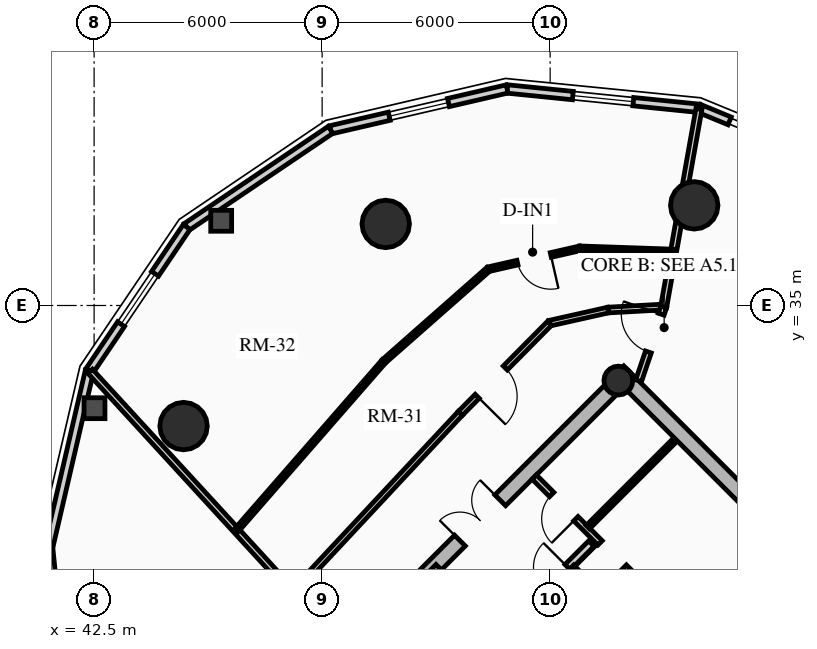
"""IFC4 building model, lengths in metres.
Left out: names, types, materials, properties, quantities, classifications, styles, units other than length and angle.
Written with IfcOpenShell. Run it as: python <this file> out.ifc"""

import sys

from ifc_helpers import new_model, si_unit, direction, frame, frame_2d, origin, origin_2d, place, context, subcontext, project, spatial, rectangle, circle, hollow_circle, extrude, source, transform, mapped, element, fill, save


model = new_model("IFC4")
c1 = context("Model", 3, precision=1e-05, world=origin(), true_north=direction((0.0, 1.0)))
c2 = subcontext(c1, "Body", "Model", "MODEL_VIEW")
j1 = project(units=[si_unit("LENGTHUNIT", "METRE"), si_unit("PLANEANGLEUNIT", "RADIAN")], contexts=[c1])
p1 = place(None, origin())
s1 = spatial("IfcSite", under=j1, at=p1, CompositionType="ELEMENT")
p2 = place(p1, origin())
s2 = spatial("IfcBuilding", under=s1, at=p2, CompositionType="ELEMENT")
p3 = place(p2, frame((0.0, 0.0, 166.15)))
s3 = spatial("IfcBuildingStorey", under=s2, at=p3, CompositionType="ELEMENT", Elevation=166.15)
p4 = place(p3, frame((66.268, 23.298, 0.0), z_axis=(0.0, 0.0, 1.0), x_axis=(-0.707106781187, 0.707106781187, 0.0)))
e1 = element("IfcWall", 1, at=p4, inside=s3, PredefinedType="SHEAR", context=c2, shape_type="SweptSolid", body=[
    extrude(rectangle(XDim=14.1, YDim=0.4, at=frame_2d((7.05, 0.0))), origin(), (0.0, 0.0, 1.0), 2.91),
])
p5 = place(p3, frame((48.873, 25.561, 0.0), z_axis=(0.0, 0.0, 1.0), x_axis=(0.707106781187, 0.707106781187, 0.0)))
e2 = element("IfcWall", 2, at=p5, inside=s3, PredefinedType="SHEAR", context=c2, shape_type="SweptSolid", body=[
    extrude(rectangle(XDim=10.7, YDim=0.4, at=frame_2d((5.35, 0.0))), origin(), (0.0, 0.0, 1.0), 2.91),
])
m1 = source(origin(), c2, "Body", "SweptSolid", [
    extrude(rectangle(XDim=1.5, YDim=2.02, at=frame_2d((0.75, 1.01))), frame((0.0, 0.21, 0.0), z_axis=(0.0, -1.0, 0.0), x_axis=(1.0, 0.0, 0.0)), (0.0, 0.0, 1.0), 0.42),
])
p6 = place(p5, frame((4.6, 0.0, 0.0)))
e3 = element("IfcOpeningElement", 3, at=p6, cuts=e2, PredefinedType="OPENING", context=c2, shape_type="MappedRepresentation", body=[
    mapped(m1, transform((0.0, 0.0, 0.0), x_axis=(1.0, 0.0, 0.0), y_axis=(0.0, 1.0, 0.0), z_axis=(0.0, 0.0, 1.0), scale=1.0)),
])
p7 = place(p3, frame((61.06, 18.373, 0.0), z_axis=(0.0, 0.0, 1.0), x_axis=(-0.707106781187, 0.707106781187, 0.0)))
e4 = element("IfcWall", 4, at=p7, inside=s3, PredefinedType="SHEAR", context=c2, shape_type="SweptSolid", body=[
    extrude(rectangle(XDim=13.7, YDim=0.35, at=frame_2d((6.85, 0.0))), origin(), (0.0, 0.0, 1.0), 2.91),
])
m2 = source(origin(), c2, "Body", "SweptSolid", [
    extrude(rectangle(XDim=1.1, YDim=2.015, at=frame_2d((0.55, 1.007))), frame((0.0, 0.185, 0.0), z_axis=(0.0, -1.0, 0.0), x_axis=(1.0, 0.0, 0.0)), (0.0, 0.0, 1.0), 0.37),
])
p8 = place(p7, frame((4.85, 0.0, 0.0)))
e5 = element("IfcOpeningElement", 5, at=p8, cuts=e4, PredefinedType="OPENING", context=c2, shape_type="MappedRepresentation", body=[
    mapped(m2, transform((0.0, 0.0, 0.0), x_axis=(1.0, 0.0, 0.0), y_axis=(0.0, 1.0, 0.0), z_axis=(0.0, 0.0, 1.0), scale=1.0)),
])
p9 = place(p7, frame((0.625, 0.0, 0.0)))
e6 = element("IfcOpeningElement", 6, at=p9, cuts=e4, PredefinedType="OPENING", context=c2, shape_type="MappedRepresentation", body=[
    mapped(m2, transform((0.0, 0.0, 0.0), x_axis=(1.0, 0.0, 0.0), y_axis=(0.0, 1.0, 0.0), z_axis=(0.0, 0.0, 1.0), scale=1.0)),
])
p10 = place(p7, frame((2.625, 0.0, 0.0)))
e7 = element("IfcOpeningElement", 7, at=p10, cuts=e4, PredefinedType="OPENING", context=c2, shape_type="MappedRepresentation", body=[
    mapped(m2, transform((0.0, 0.0, 0.0), x_axis=(1.0, 0.0, 0.0), y_axis=(0.0, 1.0, 0.0), z_axis=(0.0, 0.0, 1.0), scale=1.0)),
])
m3 = source(origin(), c2, "Body", "SweptSolid", [
    extrude(rectangle(XDim=1.15, YDim=2.02, at=frame_2d((0.575, 1.01))), frame((0.0, 0.185, 0.0), z_axis=(0.0, -1.0, 0.0), x_axis=(1.0, 0.0, 0.0)), (0.0, 0.0, 1.0), 0.37),
])
p11 = place(p7, frame((7.27, 0.0, 0.0)))
e8 = element("IfcOpeningElement", 8, at=p11, cuts=e4, PredefinedType="OPENING", context=c2, shape_type="MappedRepresentation", body=[
    mapped(m3, transform((0.0, 0.0, 0.0), x_axis=(1.0, 0.0, 0.0), y_axis=(0.0, 1.0, 0.0), z_axis=(0.0, 0.0, 1.0), scale=1.0)),
])
p12 = place(p3, frame((58.893, 25.674, 0.0), z_axis=(0.0, 0.0, 1.0), x_axis=(0.707106781187, 0.707106781187, 0.0)))
e9 = element("IfcWall", 9, at=p12, inside=s3, PredefinedType="SHEAR", context=c2, shape_type="SweptSolid", body=[
    extrude(rectangle(XDim=3.285, YDim=0.35, at=frame_2d((1.643, 0.0))), origin(), (0.0, 0.0, 1.0), 2.91),
])
p13 = place(p3, frame((56.294, 33.024, 0.0), z_axis=(0.0, 0.0, 1.0), x_axis=(0.707106781187, 0.707106781187, 0.0)))
e10 = element("IfcColumn", 10, at=p13, inside=s3, PredefinedType="COLUMN", context=c2, shape_type="SweptSolid", body=[
    extrude(hollow_circle(Radius=0.38, WallThickness=0.032, at=origin_2d()), origin(), (0.0, 0.0, 1.0), 2.91),
])
for number, where, z_axis, x_axis in (
    (11, (58.291, 37.635, 0.0), (0.0, 0.0, 1.0), (1.0, 0.0, 0.0)),
    (12, (50.173, 37.146, 0.0), (0.0, 0.0, 1.0), (1.0, 0.0, 0.0)),
    (13, (44.854, 31.827, 0.0), (0.0, 0.0, 1.0), (1.0, 0.0, 0.0)),
):
    element("IfcColumn", number, at=place(p3, frame(where, z_axis=z_axis, x_axis=x_axis)), inside=s3, PredefinedType="USERDEFINED", context=c2, shape_type="SweptSolid", body=[
        extrude(circle(Radius=0.625, at=origin_2d()), origin(), (0.0, 0.0, 1.0), 2.91),
    ])
p14 = place(p3, frame((58.418, 40.189, 0.0), z_axis=(0.0, 0.0, 1.0), x_axis=(0.924556017656, -0.381046152345, 0.0)))
e14 = element("IfcWall", 14, at=p14, inside=s3, PredefinedType="SOLIDWALL", context=c2, shape_type="SweptSolid", body=[
    extrude(rectangle(XDim=0.87, YDim=0.22, at=frame_2d((0.435, 0.0))), origin(), (0.0, 0.0, 1.0), 2.675),
])
p15 = place(p3, frame((53.367, 40.698, 0.0), z_axis=(0.0, 0.0, 1.0), x_axis=(0.994959267396, -0.100279889424, 0.0)))
e15 = element("IfcWall", 15, at=p15, inside=s3, PredefinedType="SOLIDWALL", context=c2, shape_type="SweptSolid", body=[
    extrude(rectangle(XDim=5.076, YDim=0.22, at=frame_2d((2.538, 0.0))), origin(), (0.0, 0.0, 1.0), 2.675),
])
m4 = source(origin(), c2, "Body", "SweptSolid", [
    extrude(rectangle(XDim=1.6, YDim=1.3, at=frame_2d((0.8, 0.65))), frame((0.0, 0.12, 0.0), z_axis=(0.0, -1.0, 0.0), x_axis=(1.0, 0.0, 0.0)), (0.0, 0.0, 1.0), 0.24),
])
p16 = place(p15, frame((1.738, 0.0, 0.65)))
e16 = element("IfcOpeningElement", 16, at=p16, cuts=e15, PredefinedType="OPENING", context=c2, shape_type="MappedRepresentation", body=[
    mapped(m4, transform((0.0, 0.0, 0.0), x_axis=(1.0, 0.0, 0.0), y_axis=(0.0, 1.0, 0.0), z_axis=(0.0, 0.0, 1.0), scale=1.0)),
])
p17 = place(p3, frame((48.721, 39.622, 0.0), z_axis=(0.0, 0.0, 1.0), x_axis=(0.974206226622, 0.225659540039, 0.0)))
e17 = element("IfcWall", 17, at=p17, inside=s3, PredefinedType="SOLIDWALL", context=c2, shape_type="SweptSolid", body=[
    extrude(rectangle(XDim=4.769, YDim=0.22, at=frame_2d((2.385, 0.0))), origin(), (0.0, 0.0, 1.0), 2.675),
])
p18 = place(p17, frame((1.585, 0.0, 0.65)))
e18 = element("IfcOpeningElement", 18, at=p18, cuts=e17, PredefinedType="OPENING", context=c2, shape_type="MappedRepresentation", body=[
    mapped(m4, transform((0.0, 0.0, 0.0), x_axis=(1.0, 0.0, 0.0), y_axis=(0.0, 1.0, 0.0), z_axis=(0.0, 0.0, 1.0), scale=1.0)),
])
p19 = place(p3, frame((44.935, 37.065, 0.0), z_axis=(0.0, 0.0, 1.0), x_axis=(0.828739009952, 0.559635286042, 0.0)))
e19 = element("IfcWall", 19, at=p19, inside=s3, PredefinedType="SOLIDWALL", context=c2, shape_type="SweptSolid", body=[
    extrude(rectangle(XDim=4.569, YDim=0.22, at=frame_2d((2.284, 0.0))), origin(), (0.0, 0.0, 1.0), 2.675),
])
p20 = place(p3, frame((42.378, 33.279, 0.0), z_axis=(0.0, 0.0, 1.0), x_axis=(0.559635286042, 0.828739009952, 0.0)))
e20 = element("IfcWall", 20, at=p20, inside=s3, PredefinedType="SOLIDWALL", context=c2, shape_type="SweptSolid", body=[
    extrude(rectangle(XDim=4.569, YDim=0.22, at=frame_2d((2.284, 0.0))), origin(), (0.0, 0.0, 1.0), 2.675),
])
p21 = place(p20, frame((1.484, 0.0, 0.65)))
e21 = element("IfcOpeningElement", 21, at=p21, cuts=e20, PredefinedType="OPENING", context=c2, shape_type="MappedRepresentation", body=[
    mapped(m4, transform((0.0, 0.0, 0.0), x_axis=(1.0, 0.0, 0.0), y_axis=(0.0, 1.0, 0.0), z_axis=(0.0, 0.0, 1.0), scale=1.0)),
])
p22 = place(p3, frame((41.302, 28.633, 0.0), z_axis=(0.0, 0.0, 1.0), x_axis=(0.225659540039, 0.974206226622, 0.0)))
e22 = element("IfcWall", 22, at=p22, inside=s3, PredefinedType="SOLIDWALL", context=c2, shape_type="SweptSolid", body=[
    extrude(rectangle(XDim=4.769, YDim=0.22, at=frame_2d((2.385, 0.0))), origin(), (0.0, 0.0, 1.0), 2.675),
])
p23 = place(p3, frame((41.811, 23.582, 0.0), z_axis=(0.0, 0.0, 1.0), x_axis=(-0.100279889424, 0.994959267396, 0.0)))
e23 = element("IfcWall", 23, at=p23, inside=s3, PredefinedType="SOLIDWALL", context=c2, shape_type="SweptSolid", body=[
    extrude(rectangle(XDim=5.076, YDim=0.22, at=frame_2d((2.538, 0.0))), origin(), (0.0, 0.0, 1.0), 2.675),
])
p24 = place(p23, frame((1.738, 0.0, 0.65)))
e24 = element("IfcOpeningElement", 24, at=p24, cuts=e23, PredefinedType="OPENING", context=c2, shape_type="MappedRepresentation", body=[
    mapped(m4, transform((0.0, 0.0, 0.0), x_axis=(1.0, 0.0, 0.0), y_axis=(0.0, 1.0, 0.0), z_axis=(0.0, 0.0, 1.0), scale=1.0)),
])
p25 = place(p3, frame((53.264, 26.416, 0.0), z_axis=(0.0, 0.0, 1.0), x_axis=(0.707106781187, 0.707106781187, 0.0)))
e25 = element("IfcWall", 25, at=p25, inside=s3, PredefinedType="PARTITIONING", context=c2, shape_type="SweptSolid", body=[
    extrude(rectangle(XDim=3.28, YDim=0.2, at=frame_2d((1.64, 0.0))), origin(), (0.0, 0.0, 1.0), 2.675),
])
m5 = source(origin(), c2, "Body", "SweptSolid", [
    extrude(rectangle(XDim=1.0, YDim=2.015, at=frame_2d((0.5, 1.007))), frame((0.0, 0.11, 0.0), z_axis=(0.0, -1.0, 0.0), x_axis=(1.0, 0.0, 0.0)), (0.0, 0.0, 1.0), 0.22),
])
p26 = place(p25, frame((0.14, 0.0, 0.0)))
e26 = element("IfcOpeningElement", 26, at=p26, cuts=e25, PredefinedType="OPENING", context=c2, shape_type="MappedRepresentation", body=[
    mapped(m5, transform((0.0, 0.0, 0.0), x_axis=(1.0, 0.0, 0.0), y_axis=(0.0, 1.0, 0.0), z_axis=(0.0, 0.0, 1.0), scale=1.0)),
])
m6 = source(origin(), c2, "Body", "SweptSolid", [
    extrude(rectangle(XDim=0.9, YDim=2.005, at=frame_2d((0.45, 1.002))), frame((0.0, 0.11, 0.0), z_axis=(0.0, -1.0, 0.0), x_axis=(1.0, 0.0, 0.0)), (0.0, 0.0, 1.0), 0.22),
])
p27 = place(p25, frame((1.5, 0.0, 0.0)))
e27 = element("IfcOpeningElement", 27, at=p27, cuts=e25, PredefinedType="OPENING", context=c2, shape_type="MappedRepresentation", body=[
    mapped(m6, transform((0.0, 0.0, 0.0), x_axis=(1.0, 0.0, 0.0), y_axis=(0.0, 1.0, 0.0), z_axis=(0.0, 0.0, 1.0), scale=1.0)),
])
p28 = place(p3, frame((56.673, 26.529, 0.0), z_axis=(0.0, 0.0, 1.0), x_axis=(-0.707052764397, 0.70716079385, 0.0)))
e28 = element("IfcWall", 28, at=p28, inside=s3, PredefinedType="PARTITIONING", context=c2, shape_type="SweptSolid", body=[
    extrude(rectangle(XDim=2.26, YDim=0.125, at=frame_2d((1.13, 0.0))), origin(), (0.0, 0.0, 1.0), 2.675),
])
m7 = source(origin(), c2, "Body", "SweptSolid", [
    extrude(rectangle(XDim=0.9, YDim=2.005, at=frame_2d((0.45, 1.002))), frame((0.0, 0.073, 0.0), z_axis=(0.0, -1.0, 0.0), x_axis=(1.0, 0.0, 0.0)), (0.0, 0.0, 1.0), 0.145),
])
p29 = place(p28, frame((0.65, 0.0, 0.0)))
e29 = element("IfcOpeningElement", 29, at=p29, cuts=e28, PredefinedType="OPENING", context=c2, shape_type="MappedRepresentation", body=[
    mapped(m7, transform((0.0, 0.0, 0.0), x_axis=(1.0, 0.0, 0.0), y_axis=(0.0, 1.0, 0.0), z_axis=(0.0, 0.0, 1.0), scale=1.0)),
])
p30 = place(p3, frame((56.839, 27.728, 0.0), z_axis=(0.0, 0.0, 1.0), x_axis=(-0.707106781187, 0.707106781187, 0.0)))
e30 = element("IfcWall", 30, at=p30, inside=s3, PredefinedType="PARTITIONING", context=c2, shape_type="SweptSolid", body=[
    extrude(rectangle(XDim=3.9, YDim=0.16, at=frame_2d((1.95, 0.0))), origin(), (0.0, 0.0, 1.0), 2.675),
])
m8 = source(origin(), c2, "Body", "SweptSolid", [
    extrude(rectangle(XDim=0.9, YDim=2.005, at=frame_2d((0.45, 1.002))), frame((0.0, 0.09, 0.0), z_axis=(0.0, -1.0, 0.0), x_axis=(1.0, 0.0, 0.0)), (0.0, 0.0, 1.0), 0.18),
])
p31 = place(p30, frame((0.55, 0.0, 0.0)))
e31 = element("IfcOpeningElement", 31, at=p31, cuts=e30, PredefinedType="OPENING", context=c2, shape_type="MappedRepresentation", body=[
    mapped(m8, transform((0.0, 0.0, 0.0), x_axis=(1.0, 0.0, 0.0), y_axis=(0.0, 1.0, 0.0), z_axis=(0.0, 0.0, 1.0), scale=1.0)),
])
p32 = place(p30, frame((2.35, 0.0, 0.0)))
e32 = element("IfcOpeningElement", 32, at=p32, cuts=e30, PredefinedType="OPENING", context=c2, shape_type="MappedRepresentation", body=[
    mapped(m8, transform((0.0, 0.0, 0.0), x_axis=(1.0, 0.0, 0.0), y_axis=(0.0, 1.0, 0.0), z_axis=(0.0, 0.0, 1.0), scale=1.0)),
])
p33 = place(p3, frame((55.492, 29.167, 0.0), z_axis=(0.0, 0.0, 1.0), x_axis=(0.707144688645, 0.707068871696, 0.0)))
e33 = element("IfcWall", 33, at=p33, inside=s3, PredefinedType="PARTITIONING", context=c2, shape_type="SweptSolid", body=[
    extrude(rectangle(XDim=3.22, YDim=0.125, at=frame_2d((1.61, 0.0))), origin(), (0.0, 0.0, 1.0), 2.212),
])
p34 = place(p3, frame((57.486, 34.96, 0.0), z_axis=(0.0, 0.0, 1.0), x_axis=(-0.998483871836, -0.055045051404, 0.0)))
e34 = element("IfcWall", 34, at=p34, inside=s3, PredefinedType="PARTITIONING", context=c2, shape_type="SweptSolid", body=[
    extrude(rectangle(XDim=1.464, YDim=0.15, at=frame_2d((0.732, 0.0))), origin(), (0.0, 0.0, 1.0), 2.245),
])
p35 = place(p3, frame((56.025, 34.88, 0.0), z_axis=(0.0, 0.0, 1.0), x_axis=(-0.975729093394, -0.218981132301, 0.0)))
e35 = element("IfcWall", 35, at=p35, inside=s3, PredefinedType="PARTITIONING", context=c2, shape_type="SweptSolid", body=[
    extrude(rectangle(XDim=1.575, YDim=0.15, at=frame_2d((0.788, 0.0))), origin(), (0.0, 0.0, 1.0), 2.245),
])
p36 = place(p3, frame((54.488, 34.535, 0.0), z_axis=(0.0, 0.0, 1.0), x_axis=(-0.703666289339, -0.710530613871, 0.0)))
e36 = element("IfcWall", 36, at=p36, inside=s3, PredefinedType="PARTITIONING", context=c2, shape_type="SweptSolid", body=[
    extrude(rectangle(XDim=3.343, YDim=0.15, at=frame_2d((1.672, 0.0))), origin(), (0.0, 0.0, 1.0), 2.245),
])
m9 = source(origin(), c2, "Body", "SweptSolid", [
    extrude(rectangle(XDim=1.05, YDim=2.015, at=frame_2d((0.525, 1.007))), frame((0.0, 0.085, 0.0), z_axis=(0.0, -1.0, 0.0), x_axis=(1.0, 0.0, 0.0)), (0.0, 0.0, 1.0), 0.17),
])
p37 = place(p36, frame((1.66, 0.0, 0.0)))
e37 = element("IfcOpeningElement", 37, at=p37, cuts=e36, PredefinedType="OPENING", context=c2, shape_type="MappedRepresentation", body=[
    mapped(m9, transform((0.0, 0.0, 0.0), x_axis=(1.0, 0.0, 0.0), y_axis=(0.0, 1.0, 0.0), z_axis=(0.0, 0.0, 1.0), scale=1.0)),
])
p38 = place(p3, frame((52.135, 32.159, 0.0), z_axis=(0.0, 0.0, 1.0), x_axis=(-0.682546302454, -0.730842353047, 0.0)))
e38 = element("IfcWall", 38, at=p38, inside=s3, PredefinedType="PARTITIONING", context=c2, shape_type="SweptSolid", body=[
    extrude(rectangle(XDim=6.445, YDim=0.15, at=frame_2d((3.223, 0.0))), origin(), (0.0, 0.0, 1.0), 2.245),
])
p39 = place(p3, frame((57.486, 34.96, 0.0), z_axis=(0.0, 0.0, 1.0), x_axis=(0.175432895983, 0.984491391027, 0.0)))
e39 = element("IfcWall", 39, at=p39, inside=s3, PredefinedType="PARTITIONING", context=c2, shape_type="SweptSolid", body=[
    extrude(rectangle(XDim=5.291, YDim=0.16, at=frame_2d((2.646, 0.0))), origin(), (0.0, 0.0, 1.0), 2.245),
])
p40 = place(p3, frame((47.736, 27.449, 0.0), z_axis=(0.0, 0.0, 1.0), x_axis=(-0.676056254668, 0.736850012231, 0.0)))
e40 = element("IfcWall", 40, at=p40, inside=s3, PredefinedType="PARTITIONING", context=c2, shape_type="SweptSolid", body=[
    extrude(rectangle(XDim=7.899, YDim=0.16, at=frame_2d((3.95, 0.0))), origin(), (0.0, 0.0, 1.0), 2.245),
])
p41 = place(p3, frame((56.828, 33.021, 0.0), z_axis=(0.0, 0.0, 1.0), x_axis=(0.321300161671, 0.94697740528, 0.0)))
e41 = element("IfcWall", 41, at=p41, inside=s3, PredefinedType="PARTITIONING", context=c2, shape_type="SweptSolid", body=[
    extrude(rectangle(XDim=2.049, YDim=0.16, at=frame_2d((1.024, 0.0))), origin(), (0.0, 0.0, 1.0), 2.245),
])
m10 = source(origin(), c2, "Body", "SweptSolid", [
    extrude(rectangle(XDim=1.05, YDim=2.015, at=frame_2d((0.525, 1.007))), frame((0.0, 0.09, 0.0), z_axis=(0.0, -1.0, 0.0), x_axis=(1.0, 0.0, 0.0)), (0.0, 0.0, 1.0), 0.18),
])
p42 = place(p41, frame((0.798, 0.0, 0.0)))
e42 = element("IfcOpeningElement", 42, at=p42, cuts=e41, PredefinedType="OPENING", context=c2, shape_type="MappedRepresentation", body=[
    mapped(m10, transform((0.0, 0.0, 0.0), x_axis=(1.0, 0.0, 0.0), y_axis=(0.0, 1.0, 0.0), z_axis=(0.0, 0.0, 1.0), scale=1.0)),
])
p43 = place(p3, frame((57.746, 36.419, 0.0), z_axis=(0.0, 0.0, 1.0), x_axis=(-0.999409872703, 0.03434976484, 0.0)))
e43 = element("IfcWall", 43, at=p43, inside=s3, PredefinedType="PARTITIONING", context=c2, shape_type="SweptSolid", body=[
    extrude(rectangle(XDim=2.466, YDim=0.125, at=frame_2d((1.233, 0.0))), origin(), (0.0, 0.0, 1.0), 2.245),
])
p44 = place(p3, frame((55.281, 36.504, 0.0), z_axis=(0.0, 0.0, 1.0), x_axis=(-0.974908832019, -0.222604513096, 0.0)))
e44 = element("IfcWall", 44, at=p44, inside=s3, PredefinedType="PARTITIONING", context=c2, shape_type="SweptSolid", body=[
    extrude(rectangle(XDim=2.468, YDim=0.125, at=frame_2d((1.234, 0.0))), origin(), (0.0, 0.0, 1.0), 2.245),
])
p45 = place(p44, frame((0.784, 0.0, 0.0)))
e45 = element("IfcOpeningElement", 45, at=p45, cuts=e44, PredefinedType="OPENING", context=c2, shape_type="MappedRepresentation", body=[
    mapped(m7, transform((0.0, 0.0, 0.0), x_axis=(1.0, 0.0, 0.0), y_axis=(0.0, 1.0, 0.0), z_axis=(0.0, 0.0, 1.0), scale=1.0)),
])
p46 = place(p3, frame((52.876, 35.954, 0.0), z_axis=(0.0, 0.0, 1.0), x_axis=(-0.750317340408, -0.661077823469, 0.0)))
e46 = element("IfcWall", 46, at=p46, inside=s3, PredefinedType="PARTITIONING", context=c2, shape_type="SweptSolid", body=[
    extrude(rectangle(XDim=3.669, YDim=0.125, at=frame_2d((1.834, 0.0))), origin(), (0.0, 0.0, 1.0), 2.245),
])
p47 = place(p3, frame((50.123, 33.529, 0.0), z_axis=(0.0, 0.0, 1.0), x_axis=(-0.657371249324, -0.753566878626, 0.0)))
e47 = element("IfcWall", 47, at=p47, inside=s3, PredefinedType="PARTITIONING", context=c2, shape_type="SweptSolid", body=[
    extrude(rectangle(XDim=5.906, YDim=0.125, at=frame_2d((2.953, 0.0))), origin(), (0.0, 0.0, 1.0), 2.245),
])
m11 = source(origin(), c2, "Body", "SweptSolid", [
    extrude(rectangle(XDim=1.6, YDim=1.3, at=frame_2d((0.8, 0.65))), frame((0.0, 0.03, 0.0), z_axis=(0.0, -1.0, 0.0), x_axis=(1.0, 0.0, 0.0)), (0.0, 0.0, 1.0), 0.06),
])
p48 = place(p16, origin())
e48 = element("IfcWindow", 48, at=p48, inside=s3, PartitioningType="SINGLE_PANEL", PredefinedType="WINDOW", context=c2, shape_type="MappedRepresentation", body=[
    mapped(m11, transform((0.0, 0.0, 0.0), x_axis=(1.0, 0.0, 0.0), y_axis=(0.0, 1.0, 0.0), z_axis=(0.0, 0.0, 1.0), scale=1.0)),
])
fill(e16, e48)
p49 = place(p18, origin())
e49 = element("IfcWindow", 49, at=p49, inside=s3, PartitioningType="SINGLE_PANEL", PredefinedType="WINDOW", context=c2, shape_type="MappedRepresentation", body=[
    mapped(m11, transform((0.0, 0.0, 0.0), x_axis=(1.0, 0.0, 0.0), y_axis=(0.0, 1.0, 0.0), z_axis=(0.0, 0.0, 1.0), scale=1.0)),
])
fill(e18, e49)
p50 = place(p21, origin())
e50 = element("IfcWindow", 50, at=p50, inside=s3, PartitioningType="SINGLE_PANEL", PredefinedType="WINDOW", context=c2, shape_type="MappedRepresentation", body=[
    mapped(m11, transform((0.0, 0.0, 0.0), x_axis=(1.0, 0.0, 0.0), y_axis=(0.0, 1.0, 0.0), z_axis=(0.0, 0.0, 1.0), scale=1.0)),
])
fill(e21, e50)
m12 = source(origin(), c2, "Body", "SweptSolid", [
    extrude(rectangle(XDim=1.5, YDim=2.02, at=frame_2d((0.75, 1.01))), frame((0.0, 0.025, 0.0), z_axis=(0.0, -1.0, 0.0), x_axis=(1.0, 0.0, 0.0)), (0.0, 0.0, 1.0), 0.05),
])
p51 = place(p6, origin())
e51 = element("IfcDoor", 51, at=p51, inside=s3, OperationType="DOUBLE_DOOR_SINGLE_SWING", PredefinedType="DOOR", context=c2, shape_type="MappedRepresentation", body=[
    mapped(m12, transform((0.0, 0.0, 0.0), x_axis=(1.0, 0.0, 0.0), y_axis=(0.0, 1.0, 0.0), z_axis=(0.0, 0.0, 1.0), scale=1.0)),
])
fill(e3, e51)
m13 = source(origin(), c2, "Body", "SweptSolid", [
    extrude(rectangle(XDim=0.9, YDim=2.005, at=frame_2d((0.45, 1.002))), frame((0.0, 0.025, 0.0), z_axis=(0.0, -1.0, 0.0), x_axis=(1.0, 0.0, 0.0)), (0.0, 0.0, 1.0), 0.05),
])
p52 = place(p27, origin())
e52 = element("IfcDoor", 52, at=p52, inside=s3, OperationType="SINGLE_SWING_RIGHT", PredefinedType="DOOR", context=c2, shape_type="MappedRepresentation", body=[
    mapped(m13, transform((0.0, 0.0, 0.0), x_axis=(1.0, 0.0, 0.0), y_axis=(0.0, 1.0, 0.0), z_axis=(0.0, 0.0, 1.0), scale=1.0)),
])
fill(e27, e52)
p53 = place(p31, origin())
e53 = element("IfcDoor", 53, at=p53, inside=s3, OperationType="SINGLE_SWING_RIGHT", PredefinedType="DOOR", context=c2, shape_type="MappedRepresentation", body=[
    mapped(m13, transform((0.0, 0.0, 0.0), x_axis=(1.0, 0.0, 0.0), y_axis=(0.0, 1.0, 0.0), z_axis=(0.0, 0.0, 1.0), scale=1.0)),
])
fill(e31, e53)
p54 = place(p32, origin())
e54 = element("IfcDoor", 54, at=p54, inside=s3, OperationType="SINGLE_SWING_LEFT", PredefinedType="DOOR", context=c2, shape_type="MappedRepresentation", body=[
    mapped(m13, transform((0.0, 0.0, 0.0), x_axis=(1.0, 0.0, 0.0), y_axis=(0.0, 1.0, 0.0), z_axis=(0.0, 0.0, 1.0), scale=1.0)),
])
fill(e32, e54)
m14 = source(origin(), c2, "Body", "SweptSolid", [
    extrude(rectangle(XDim=1.05, YDim=2.015, at=frame_2d((0.525, 1.007))), frame((0.0, 0.025, 0.0), z_axis=(0.0, -1.0, 0.0), x_axis=(1.0, 0.0, 0.0)), (0.0, 0.0, 1.0), 0.05),
])
p55 = place(p42, origin())
e55 = element("IfcDoor", 55, at=p55, inside=s3, OperationType="SINGLE_SWING_RIGHT", PredefinedType="DOOR", context=c2, shape_type="MappedRepresentation", body=[
    mapped(m14, transform((0.0, 0.0, 0.0), x_axis=(1.0, 0.0, 0.0), y_axis=(0.0, 1.0, 0.0), z_axis=(0.0, 0.0, 1.0), scale=1.0)),
])
fill(e42, e55)
p56 = place(p37, origin())
e56 = element("IfcDoor", 56, at=p56, inside=s3, OperationType="SINGLE_SWING_RIGHT", PredefinedType="DOOR", context=c2, shape_type="MappedRepresentation", body=[
    mapped(m14, transform((0.0, 0.0, 0.0), x_axis=(1.0, 0.0, 0.0), y_axis=(0.0, 1.0, 0.0), z_axis=(0.0, 0.0, 1.0), scale=1.0)),
])
fill(e37, e56)
p57 = place(p45, origin())
e57 = element("IfcDoor", 57, at=p57, inside=s3, OperationType="SINGLE_SWING_LEFT", PredefinedType="DOOR", context=c2, shape_type="MappedRepresentation", body=[
    mapped(m13, transform((0.0, 0.0, 0.0), x_axis=(1.0, 0.0, 0.0), y_axis=(0.0, 1.0, 0.0), z_axis=(0.0, 0.0, 1.0), scale=1.0)),
])
fill(e45, e57)
save(model, sys.argv[1])
